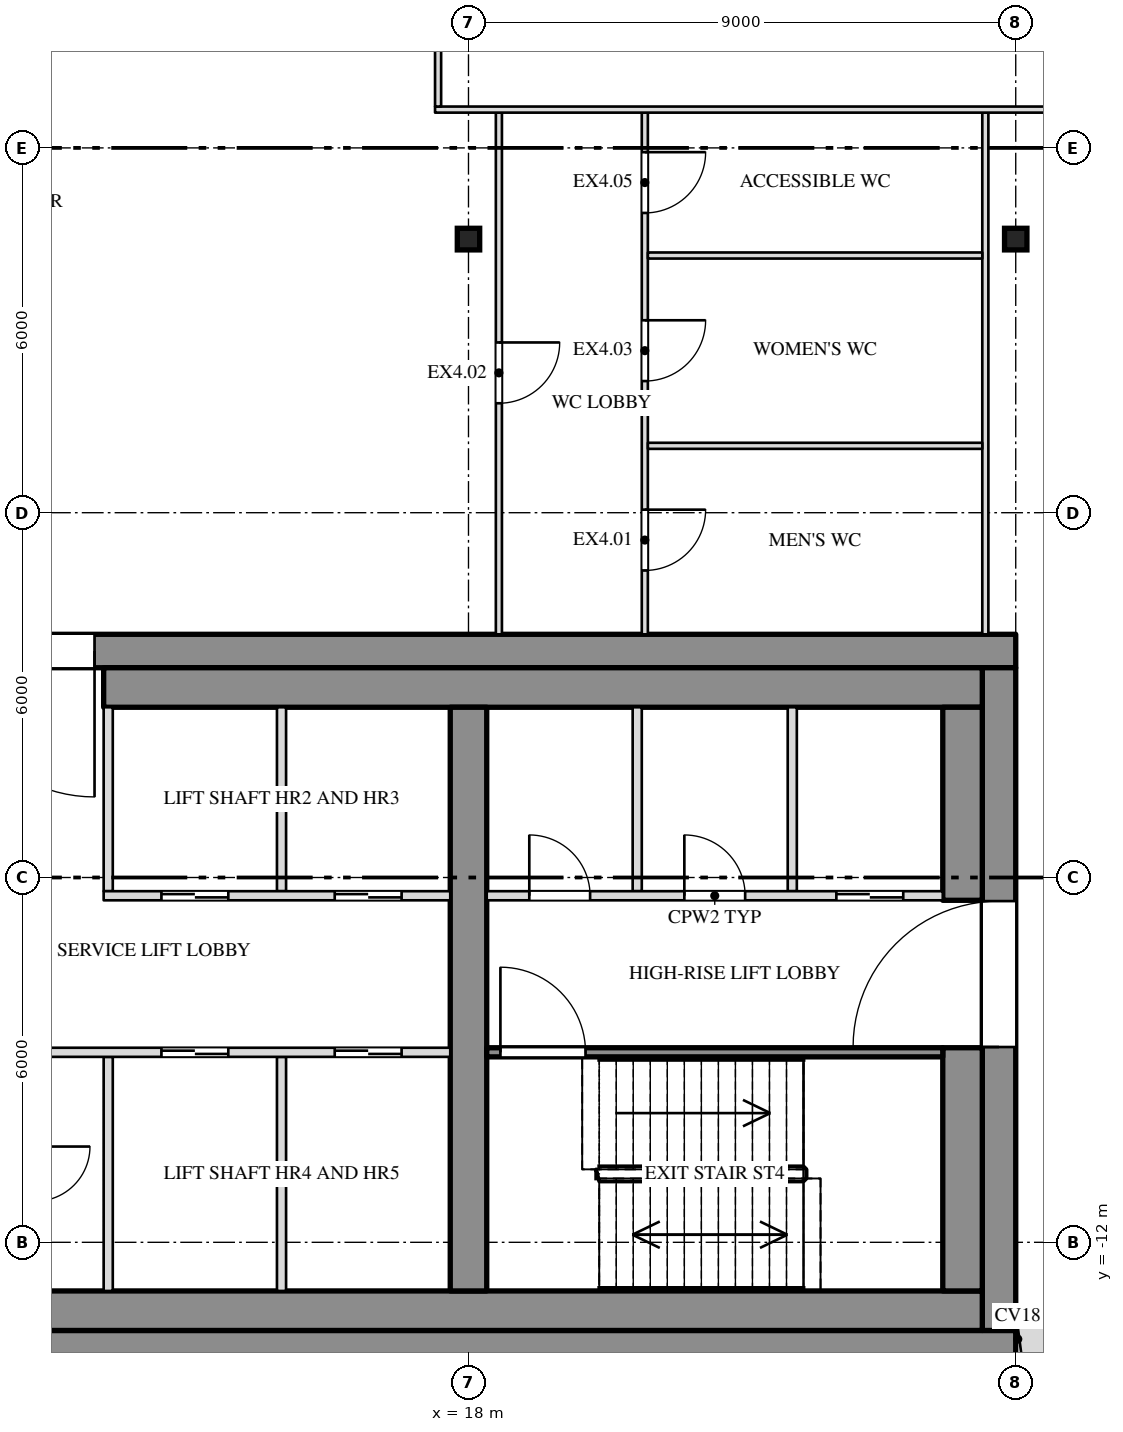
"""IFC4 building model, lengths in metres.
Left out: names, types, materials, properties, quantities, classifications, styles, units other than length and angle.
Written with IfcOpenShell. Run it as: python <this file> out.ifc"""

import sys

from ifc_helpers import new_model, si_unit, direction, frame, frame_2d, origin, origin_2d, place, context, subcontext, project, spatial, rectangle, i_section, extrude, element, fill, save


model = new_model("IFC4")
c1 = context("Model", 3, precision=1e-05, world=origin(), true_north=direction((0.0, 1.0)))
c2 = subcontext(c1, "Body", "Model", "MODEL_VIEW")
j1 = project(units=[si_unit("LENGTHUNIT", "METRE"), si_unit("PLANEANGLEUNIT", "RADIAN")], contexts=[c1])
p1 = place(None, origin())
s1 = spatial("IfcSite", under=j1, at=p1, CompositionType="ELEMENT")
p2 = place(p1, origin())
s2 = spatial("IfcBuilding", under=s1, at=p2, CompositionType="ELEMENT")
p3 = place(p2, frame((0.0, 0.0, 284.5)))
s3 = spatial("IfcBuildingStorey", under=s2, at=p3, CompositionType="ELEMENT", Elevation=284.5)
for number, where, z_axis, x_axis in (
    (1, (18.0, 4.5, 0.0), (0.0, 0.0, 1.0), (1.0, 0.0, 0.0)),
    (2, (27.0, 4.5, 0.0), (0.0, 0.0, 1.0), (1.0, 0.0, 0.0)),
):
    element("IfcColumn", number, at=place(p3, frame(where, z_axis=z_axis, x_axis=x_axis)), inside=s3, PredefinedType="COLUMN", context=c2, shape_type="SweptSolid", body=[
        extrude(i_section(OverallWidth=0.368, OverallDepth=0.356, WebThickness=0.011, FlangeThickness=0.018, at=origin_2d()), origin(), (0.0, 0.0, 1.0), 4.0),
    ])
p4 = place(p3, frame((-27.0, -2.275, 0.0), z_axis=(0.0, 0.0, 1.0), x_axis=(1.0, 0.0, 0.0)))
e3 = element("IfcWall", 3, at=p4, inside=s3, PredefinedType="SHEAR", context=c2, shape_type="SweptSolid", body=[
    extrude(rectangle(XDim=54.0, YDim=0.55, at=frame_2d((27.0, 0.0))), origin(), (0.0, 0.0, 1.0), 3.78),
])
p5 = place(p4, frame((15.15, 0.0, 0.0)))
e4 = element("IfcOpeningElement", 4, at=p5, cuts=e3, PredefinedType="OPENING", context=c2, shape_type="SweptSolid", body=[
    extrude(rectangle(XDim=2.4, YDim=2.1, at=frame_2d((1.2, 1.05))), frame((0.0, 0.287, 0.0), z_axis=(0.0, -1.0, 0.0), x_axis=(1.0, 0.0, 0.0)), (0.0, 0.0, 1.0), 0.574),
])
p6 = place(p4, frame((36.45, 0.0, 0.0)))
e5 = element("IfcOpeningElement", 5, at=p6, cuts=e3, PredefinedType="OPENING", context=c2, shape_type="SweptSolid", body=[
    extrude(rectangle(XDim=2.4, YDim=2.1, at=frame_2d((1.2, 1.05))), frame((0.0, 0.287, 0.0), z_axis=(0.0, -1.0, 0.0), x_axis=(1.0, 0.0, 0.0)), (0.0, 0.0, 1.0), 0.574),
])
p7 = place(p3, frame((-27.0, -13.725, 0.0), z_axis=(0.0, 0.0, 1.0), x_axis=(1.0, 0.0, 0.0)))
e6 = element("IfcWall", 6, at=p7, inside=s3, PredefinedType="SHEAR", context=c2, shape_type="SweptSolid", body=[
    extrude(rectangle(XDim=54.0, YDim=0.55, at=frame_2d((27.0, 0.0))), origin(), (0.0, 0.0, 1.0), 3.78),
])
p8 = place(p3, frame((26.725, -13.45, 0.0), z_axis=(0.0, 0.0, 1.0), x_axis=(0.0, 1.0, 0.0)))
e7 = element("IfcWall", 7, at=p8, inside=s3, PredefinedType="SHEAR", context=c2, shape_type="SweptSolid", body=[
    extrude(rectangle(XDim=10.9, YDim=0.55, at=frame_2d((5.45, 0.0))), origin(), (0.0, 0.0, 1.0), 3.78),
])
p9 = place(p8, frame((4.662, 0.0, 0.0)))
e8 = element("IfcOpeningElement", 8, at=p9, cuts=e7, PredefinedType="OPENING", context=c2, shape_type="SweptSolid", body=[
    extrude(rectangle(XDim=2.4, YDim=2.1, at=frame_2d((1.2, 1.05))), frame((0.0, 0.287, 0.0), z_axis=(0.0, -1.0, 0.0), x_axis=(1.0, 0.0, 0.0)), (0.0, 0.0, 1.0), 0.574),
])
p10 = place(p3, frame((12.0, -2.875, 0.0), z_axis=(0.0, 0.0, 1.0), x_axis=(1.0, 0.0, 0.0)))
e9 = element("IfcWall", 9, at=p10, inside=s3, PredefinedType="SHEAR", context=c2, shape_type="SweptSolid", body=[
    extrude(rectangle(XDim=14.45, YDim=0.65, at=frame_2d((7.225, 0.0))), origin(), (0.0, 0.0, 1.0), 3.78),
])
p11 = place(p3, frame((-26.45, -13.125, 0.0), z_axis=(0.0, 0.0, 1.0), x_axis=(1.0, 0.0, 0.0)))
e10 = element("IfcWall", 10, at=p11, inside=s3, PredefinedType="SHEAR", context=c2, shape_type="SweptSolid", body=[
    extrude(rectangle(XDim=52.9, YDim=0.65, at=frame_2d((26.45, 0.0))), origin(), (0.0, 0.0, 1.0), 3.78),
])
p12 = place(p3, frame((26.125, -12.8, 0.0), z_axis=(0.0, 0.0, 1.0), x_axis=(0.0, 1.0, 0.0)))
e11 = element("IfcWall", 11, at=p12, inside=s3, PredefinedType="SHEAR", context=c2, shape_type="SweptSolid", body=[
    extrude(rectangle(XDim=4.0, YDim=0.65, at=frame_2d((2.0, 0.0))), origin(), (0.0, 0.0, 1.0), 3.78),
])
p13 = place(p3, frame((26.125, -6.375, 0.0), z_axis=(0.0, 0.0, 1.0), x_axis=(0.0, 1.0, 0.0)))
e12 = element("IfcWall", 12, at=p13, inside=s3, PredefinedType="SHEAR", context=c2, shape_type="SweptSolid", body=[
    extrude(rectangle(XDim=3.175, YDim=0.65, at=frame_2d((1.587, 0.0))), origin(), (0.0, 0.0, 1.0), 3.78),
])
p14 = place(p3, frame((18.0, -12.8, 0.0), z_axis=(0.0, 0.0, 1.0), x_axis=(0.0, 1.0, 0.0)))
e13 = element("IfcWall", 13, at=p14, inside=s3, PredefinedType="SHEAR", context=c2, shape_type="SweptSolid", body=[
    extrude(rectangle(XDim=9.6, YDim=0.6, at=frame_2d((4.8, 0.0))), origin(), (0.0, 0.0, 1.0), 3.78),
])
p15 = place(p3, frame((18.5, -2.0, 0.0), z_axis=(0.0, 0.0, 1.0), x_axis=(0.0, 1.0, 0.0)))
e14 = element("IfcWall", 14, at=p15, inside=s3, PredefinedType="PARTITIONING", context=c2, shape_type="SweptSolid", body=[
    extrude(rectangle(XDim=8.58, YDim=0.1, at=frame_2d((4.29, 0.0))), origin(), (0.0, 0.0, 1.0), 3.78),
])
p16 = place(p15, frame((3.8, 0.0, 0.0)))
e15 = element("IfcOpeningElement", 15, at=p16, cuts=e14, PredefinedType="OPENING", context=c2, shape_type="SweptSolid", body=[
    extrude(rectangle(XDim=1.0, YDim=2.1, at=frame_2d((0.5, 1.05))), frame((0.0, 0.062, 0.0), z_axis=(0.0, -1.0, 0.0), x_axis=(1.0, 0.0, 0.0)), (0.0, 0.0, 1.0), 0.124),
])
p17 = place(p3, frame((20.9, -2.0, 0.0), z_axis=(0.0, 0.0, 1.0), x_axis=(0.0, 1.0, 0.0)))
e16 = element("IfcWall", 16, at=p17, inside=s3, PredefinedType="PARTITIONING", context=c2, shape_type="SweptSolid", body=[
    extrude(rectangle(XDim=8.58, YDim=0.1, at=frame_2d((4.29, 0.0))), origin(), (0.0, 0.0, 1.0), 3.78),
])
p18 = place(p17, frame((1.05, 0.0, 0.0)))
e17 = element("IfcOpeningElement", 17, at=p18, cuts=e16, PredefinedType="OPENING", context=c2, shape_type="SweptSolid", body=[
    extrude(rectangle(XDim=1.0, YDim=2.1, at=frame_2d((0.5, 1.05))), frame((0.0, 0.062, 0.0), z_axis=(0.0, -1.0, 0.0), x_axis=(1.0, 0.0, 0.0)), (0.0, 0.0, 1.0), 0.124),
])
p19 = place(p17, frame((4.165, 0.0, 0.0)))
e18 = element("IfcOpeningElement", 18, at=p19, cuts=e16, PredefinedType="OPENING", context=c2, shape_type="SweptSolid", body=[
    extrude(rectangle(XDim=1.0, YDim=2.1, at=frame_2d((0.5, 1.05))), frame((0.0, 0.062, 0.0), z_axis=(0.0, -1.0, 0.0), x_axis=(1.0, 0.0, 0.0)), (0.0, 0.0, 1.0), 0.124),
])
p20 = place(p17, frame((6.93, 0.0, 0.0)))
e19 = element("IfcOpeningElement", 19, at=p20, cuts=e16, PredefinedType="OPENING", context=c2, shape_type="SweptSolid", body=[
    extrude(rectangle(XDim=1.0, YDim=2.1, at=frame_2d((0.5, 1.05))), frame((0.0, 0.062, 0.0), z_axis=(0.0, -1.0, 0.0), x_axis=(1.0, 0.0, 0.0)), (0.0, 0.0, 1.0), 0.124),
])
p21 = place(p3, frame((26.5, -2.0, 0.0), z_axis=(0.0, 0.0, 1.0), x_axis=(0.0, 1.0, 0.0)))
e20 = element("IfcWall", 20, at=p21, inside=s3, PredefinedType="PARTITIONING", context=c2, shape_type="SweptSolid", body=[
    extrude(rectangle(XDim=8.58, YDim=0.1, at=frame_2d((4.29, 0.0))), origin(), (0.0, 0.0, 1.0), 3.78),
])
for number, where, z_axis, x_axis in (
    (21, (20.95, 1.1, 0.0), (0.0, 0.0, 1.0), (1.0, 0.0, 0.0)),
    (22, (20.95, 4.23, 0.0), (0.0, 0.0, 1.0), (1.0, 0.0, 0.0)),
):
    element("IfcWall", number, at=place(p3, frame(where, z_axis=z_axis, x_axis=x_axis)), inside=s3, PredefinedType="PARTITIONING", context=c2, shape_type="SweptSolid", body=[
        extrude(rectangle(XDim=5.5, YDim=0.1, at=frame_2d((2.75, 0.0))), origin(), (0.0, 0.0, 1.0), 3.78),
    ])
p22 = place(p3, frame((17.45, 6.63, 0.0), z_axis=(0.0, 0.0, 1.0), x_axis=(1.0, 0.0, 0.0)))
e23 = element("IfcWall", 23, at=p22, inside=s3, PredefinedType="PARTITIONING", context=c2, shape_type="SweptSolid", body=[
    extrude(rectangle(XDim=14.75, YDim=0.1, at=frame_2d((7.375, 0.0))), origin(), (0.0, 0.0, 1.0), 3.78),
])
p23 = place(p3, frame((17.5, 6.68, 0.0), z_axis=(0.0, 0.0, 1.0), x_axis=(0.0, 1.0, 0.0)))
e24 = element("IfcWall", 24, at=p23, inside=s3, PredefinedType="PARTITIONING", context=c2, shape_type="SweptSolid", body=[
    extrude(rectangle(XDim=29.52, YDim=0.1, at=frame_2d((14.76, 0.0))), origin(), (0.0, 0.0, 1.0), 3.78),
])
p24 = place(p23, frame((9.22, 0.0, 0.0)))
e25 = element("IfcOpeningElement", 25, at=p24, cuts=e24, PredefinedType="OPENING", context=c2, shape_type="SweptSolid", body=[
    extrude(rectangle(XDim=0.9, YDim=2.1, at=frame_2d((0.45, 1.05))), frame((0.0, 0.062, 0.0), z_axis=(0.0, -1.0, 0.0), x_axis=(1.0, 0.0, 0.0)), (0.0, 0.0, 1.0), 0.124),
])
p25 = place(p23, frame((16.56, 0.0, 0.0)))
e26 = element("IfcOpeningElement", 26, at=p25, cuts=e24, PredefinedType="OPENING", context=c2, shape_type="SweptSolid", body=[
    extrude(rectangle(XDim=0.9, YDim=2.1, at=frame_2d((0.45, 1.05))), frame((0.0, 0.062, 0.0), z_axis=(0.0, -1.0, 0.0), x_axis=(1.0, 0.0, 0.0)), (0.0, 0.0, 1.0), 0.124),
])
p26 = place(p3, frame((27.059, -13.589, 0.0), z_axis=(0.0, 0.0, 1.0), x_axis=(0.991443199569, 0.13053881426, 0.0)))
e27 = element("IfcWall", 27, at=p26, inside=s3, PredefinedType="SOLIDWALL", context=c2, shape_type="SweptSolid", body=[
    extrude(rectangle(XDim=1.348, YDim=0.8, at=frame_2d((0.674, 0.0))), origin(), (0.0, 0.0, 1.0), 3.78),
])
for number, where, z_axis, x_axis in (
    (28, (12.075, -6.225, 0.0), (0.0, 0.0, 1.0), (0.0, 1.0, 0.0)),
    (29, (14.925, -6.225, 0.0), (0.0, 0.0, 1.0), (0.0, 1.0, 0.0)),
    (30, (20.775, -6.225, 0.0), (0.0, 0.0, 1.0), (0.0, 1.0, 0.0)),
    (31, (23.325, -6.225, 0.0), (0.0, 0.0, 1.0), (0.0, 1.0, 0.0)),
):
    element("IfcWall", number, at=place(p3, frame(where, z_axis=z_axis, x_axis=x_axis)), inside=s3, PredefinedType="PARTITIONING", context=c2, shape_type="SweptSolid", body=[
        extrude(rectangle(XDim=3.025, YDim=0.15, at=frame_2d((1.513, 0.0))), origin(), (0.0, 0.0, 1.0), 3.78),
    ])
for number, where, z_axis, x_axis in (
    (32, (12.075, -12.8, 0.0), (0.0, 0.0, 1.0), (0.0, 1.0, 0.0)),
    (33, (14.925, -12.8, 0.0), (0.0, 0.0, 1.0), (0.0, 1.0, 0.0)),
):
    element("IfcWall", number, at=place(p3, frame(where, z_axis=z_axis, x_axis=x_axis)), inside=s3, PredefinedType="PARTITIONING", context=c2, shape_type="SweptSolid", body=[
        extrude(rectangle(XDim=3.85, YDim=0.15, at=frame_2d((1.925, 0.0))), origin(), (0.0, 0.0, 1.0), 3.78),
    ])
p27 = place(p3, frame((12.0, -6.3, 0.0), z_axis=(0.0, 0.0, 1.0), x_axis=(1.0, 0.0, 0.0)))
e34 = element("IfcWall", 34, at=p27, inside=s3, PredefinedType="PARTITIONING", context=c2, shape_type="SweptSolid", body=[
    extrude(rectangle(XDim=5.7, YDim=0.15, at=frame_2d((2.85, 0.0))), origin(), (0.0, 0.0, 1.0), 3.78),
])
p28 = place(p27, frame((0.95, 0.0, 0.0)))
e35 = element("IfcOpeningElement", 35, at=p28, cuts=e34, PredefinedType="OPENING", context=c2, shape_type="SweptSolid", body=[
    extrude(rectangle(XDim=1.1, YDim=2.1, at=frame_2d((0.55, 1.05))), frame((0.0, 0.087, 0.0), z_axis=(0.0, -1.0, 0.0), x_axis=(1.0, 0.0, 0.0)), (0.0, 0.0, 1.0), 0.174),
])
p29 = place(p27, frame((3.8, 0.0, 0.0)))
e36 = element("IfcOpeningElement", 36, at=p29, cuts=e34, PredefinedType="OPENING", context=c2, shape_type="SweptSolid", body=[
    extrude(rectangle(XDim=1.1, YDim=2.1, at=frame_2d((0.55, 1.05))), frame((0.0, 0.087, 0.0), z_axis=(0.0, -1.0, 0.0), x_axis=(1.0, 0.0, 0.0)), (0.0, 0.0, 1.0), 0.174),
])
p30 = place(p3, frame((18.3, -6.3, 0.0), z_axis=(0.0, 0.0, 1.0), x_axis=(1.0, 0.0, 0.0)))
e37 = element("IfcWall", 37, at=p30, inside=s3, PredefinedType="PARTITIONING", context=c2, shape_type="SweptSolid", body=[
    extrude(rectangle(XDim=7.5, YDim=0.15, at=frame_2d((3.75, 0.0))), origin(), (0.0, 0.0, 1.0), 3.78),
])
p31 = place(p30, frame((0.7, 0.0, 0.0)))
e38 = element("IfcOpeningElement", 38, at=p31, cuts=e37, PredefinedType="OPENING", context=c2, shape_type="SweptSolid", body=[
    extrude(rectangle(XDim=1.0, YDim=2.1, at=frame_2d((0.5, 1.05))), frame((0.0, 0.087, 0.0), z_axis=(0.0, -1.0, 0.0), x_axis=(1.0, 0.0, 0.0)), (0.0, 0.0, 1.0), 0.174),
])
p32 = place(p30, frame((3.25, 0.0, 0.0)))
e39 = element("IfcOpeningElement", 39, at=p32, cuts=e37, PredefinedType="OPENING", context=c2, shape_type="SweptSolid", body=[
    extrude(rectangle(XDim=1.0, YDim=2.1, at=frame_2d((0.5, 1.05))), frame((0.0, 0.087, 0.0), z_axis=(0.0, -1.0, 0.0), x_axis=(1.0, 0.0, 0.0)), (0.0, 0.0, 1.0), 0.174),
])
p33 = place(p30, frame((5.75, 0.0, 0.0)))
e40 = element("IfcOpeningElement", 40, at=p33, cuts=e37, PredefinedType="OPENING", context=c2, shape_type="SweptSolid", body=[
    extrude(rectangle(XDim=1.1, YDim=2.1, at=frame_2d((0.55, 1.05))), frame((0.0, 0.087, 0.0), z_axis=(0.0, -1.0, 0.0), x_axis=(1.0, 0.0, 0.0)), (0.0, 0.0, 1.0), 0.174),
])
p34 = place(p3, frame((10.8, -8.875, 0.0), z_axis=(0.0, 0.0, 1.0), x_axis=(1.0, 0.0, 0.0)))
e41 = element("IfcWall", 41, at=p34, inside=s3, PredefinedType="PARTITIONING", context=c2, shape_type="SweptSolid", body=[
    extrude(rectangle(XDim=6.9, YDim=0.15, at=frame_2d((3.45, 0.0))), origin(), (0.0, 0.0, 1.0), 3.78),
])
p35 = place(p34, frame((2.15, 0.0, 0.0)))
e42 = element("IfcOpeningElement", 42, at=p35, cuts=e41, PredefinedType="OPENING", context=c2, shape_type="SweptSolid", body=[
    extrude(rectangle(XDim=1.1, YDim=2.1, at=frame_2d((0.55, 1.05))), frame((0.0, 0.087, 0.0), z_axis=(0.0, -1.0, 0.0), x_axis=(1.0, 0.0, 0.0)), (0.0, 0.0, 1.0), 0.174),
])
p36 = place(p34, frame((5.0, 0.0, 0.0)))
e43 = element("IfcOpeningElement", 43, at=p36, cuts=e41, PredefinedType="OPENING", context=c2, shape_type="SweptSolid", body=[
    extrude(rectangle(XDim=1.1, YDim=2.1, at=frame_2d((0.55, 1.05))), frame((0.0, 0.087, 0.0), z_axis=(0.0, -1.0, 0.0), x_axis=(1.0, 0.0, 0.0)), (0.0, 0.0, 1.0), 0.174),
])
p37 = place(p3, frame((18.3, -8.875, 0.0), z_axis=(0.0, 0.0, 1.0), x_axis=(1.0, 0.0, 0.0)))
e44 = element("IfcWall", 44, at=p37, inside=s3, PredefinedType="SHEAR", context=c2, shape_type="SweptSolid", body=[
    extrude(rectangle(XDim=7.5, YDim=0.15, at=frame_2d((3.75, 0.0))), origin(), (0.0, 0.0, 1.0), 3.78),
])
p38 = place(p37, frame((0.225, 0.0, 0.0)))
e45 = element("IfcOpeningElement", 45, at=p38, cuts=e44, PredefinedType="OPENING", context=c2, shape_type="SweptSolid", body=[
    extrude(rectangle(XDim=1.4, YDim=2.1, at=frame_2d((0.7, 1.05))), frame((0.0, 0.087, 0.0), z_axis=(0.0, -1.0, 0.0), x_axis=(1.0, 0.0, 0.0)), (0.0, 0.0, 1.0), 0.174),
])
p39 = place(p18, origin())
e46 = element("IfcDoor", 46, at=p39, inside=s3, OperationType="SINGLE_SWING_LEFT", PredefinedType="DOOR", context=c2, shape_type="SweptSolid", body=[
    extrude(rectangle(XDim=1.0, YDim=2.1, at=frame_2d((0.5, 1.05))), frame((0.0, 0.025, 0.0), z_axis=(0.0, -1.0, 0.0), x_axis=(1.0, 0.0, 0.0)), (0.0, 0.0, 1.0), 0.05),
])
fill(e17, e46)
p40 = place(p16, origin())
e47 = element("IfcDoor", 47, at=p40, inside=s3, OperationType="SINGLE_SWING_LEFT", PredefinedType="DOOR", context=c2, shape_type="SweptSolid", body=[
    extrude(rectangle(XDim=1.0, YDim=2.1, at=frame_2d((0.5, 1.05))), frame((0.0, 0.025, 0.0), z_axis=(0.0, -1.0, 0.0), x_axis=(1.0, 0.0, 0.0)), (0.0, 0.0, 1.0), 0.05),
])
fill(e15, e47)
p41 = place(p19, origin())
e48 = element("IfcDoor", 48, at=p41, inside=s3, OperationType="SINGLE_SWING_LEFT", PredefinedType="DOOR", context=c2, shape_type="SweptSolid", body=[
    extrude(rectangle(XDim=1.0, YDim=2.1, at=frame_2d((0.5, 1.05))), frame((0.0, 0.025, 0.0), z_axis=(0.0, -1.0, 0.0), x_axis=(1.0, 0.0, 0.0)), (0.0, 0.0, 1.0), 0.05),
])
fill(e18, e48)
p42 = place(p20, origin())
e49 = element("IfcDoor", 49, at=p42, inside=s3, OperationType="SINGLE_SWING_LEFT", PredefinedType="DOOR", context=c2, shape_type="SweptSolid", body=[
    extrude(rectangle(XDim=1.0, YDim=2.1, at=frame_2d((0.5, 1.05))), frame((0.0, 0.025, 0.0), z_axis=(0.0, -1.0, 0.0), x_axis=(1.0, 0.0, 0.0)), (0.0, 0.0, 1.0), 0.05),
])
fill(e19, e49)
p43 = place(p6, origin())
e50 = element("IfcDoor", 50, at=p43, inside=s3, OperationType="DOUBLE_DOOR_SINGLE_SWING", PredefinedType="DOOR", context=c2, shape_type="SweptSolid", body=[
    extrude(rectangle(XDim=2.4, YDim=2.1, at=frame_2d((1.2, 1.05))), frame((0.0, 0.025, 0.0), z_axis=(0.0, -1.0, 0.0), x_axis=(1.0, 0.0, 0.0)), (0.0, 0.0, 1.0), 0.05),
])
fill(e5, e50)
p44 = place(p35, origin())
e51 = element("IfcDoor", 51, at=p44, inside=s3, OperationType="SLIDING_TO_RIGHT", PredefinedType="DOOR", context=c2, shape_type="SweptSolid", body=[
    extrude(rectangle(XDim=1.1, YDim=2.1, at=frame_2d((0.55, 1.05))), frame((0.0, 0.025, 0.0), z_axis=(0.0, -1.0, 0.0), x_axis=(1.0, 0.0, 0.0)), (0.0, 0.0, 1.0), 0.05),
])
fill(e42, e51)
p45 = place(p28, origin())
e52 = element("IfcDoor", 52, at=p45, inside=s3, OperationType="SLIDING_TO_LEFT", PredefinedType="DOOR", context=c2, shape_type="SweptSolid", body=[
    extrude(rectangle(XDim=1.1, YDim=2.1, at=frame_2d((0.55, 1.05))), frame((0.0, 0.025, 0.0), z_axis=(0.0, -1.0, 0.0), x_axis=(1.0, 0.0, 0.0)), (0.0, 0.0, 1.0), 0.05),
])
fill(e35, e52)
p46 = place(p36, origin())
e53 = element("IfcDoor", 53, at=p46, inside=s3, OperationType="SLIDING_TO_RIGHT", PredefinedType="DOOR", context=c2, shape_type="SweptSolid", body=[
    extrude(rectangle(XDim=1.1, YDim=2.1, at=frame_2d((0.55, 1.05))), frame((0.0, 0.025, 0.0), z_axis=(0.0, -1.0, 0.0), x_axis=(1.0, 0.0, 0.0)), (0.0, 0.0, 1.0), 0.05),
])
fill(e43, e53)
p47 = place(p29, origin())
e54 = element("IfcDoor", 54, at=p47, inside=s3, OperationType="SLIDING_TO_LEFT", PredefinedType="DOOR", context=c2, shape_type="SweptSolid", body=[
    extrude(rectangle(XDim=1.1, YDim=2.1, at=frame_2d((0.55, 1.05))), frame((0.0, 0.025, 0.0), z_axis=(0.0, -1.0, 0.0), x_axis=(1.0, 0.0, 0.0)), (0.0, 0.0, 1.0), 0.05),
])
fill(e36, e54)
p48 = place(p38, origin())
e55 = element("IfcDoor", 55, at=p48, inside=s3, OperationType="DOUBLE_DOOR_SINGLE_SWING", PredefinedType="DOOR", context=c2, shape_type="SweptSolid", body=[
    extrude(rectangle(XDim=1.4, YDim=2.1, at=frame_2d((0.7, 1.05))), frame((0.0, 0.025, 0.0), z_axis=(0.0, -1.0, 0.0), x_axis=(1.0, 0.0, 0.0)), (0.0, 0.0, 1.0), 0.05),
])
fill(e45, e55)
p49 = place(p31, origin())
e56 = element("IfcDoor", 56, at=p49, inside=s3, OperationType="SINGLE_SWING_LEFT", PredefinedType="DOOR", context=c2, shape_type="SweptSolid", body=[
    extrude(rectangle(XDim=1.0, YDim=2.1, at=frame_2d((0.5, 1.05))), frame((0.0, 0.025, 0.0), z_axis=(0.0, -1.0, 0.0), x_axis=(1.0, 0.0, 0.0)), (0.0, 0.0, 1.0), 0.05),
])
fill(e38, e56)
p50 = place(p32, origin())
e57 = element("IfcDoor", 57, at=p50, inside=s3, OperationType="SINGLE_SWING_LEFT", PredefinedType="DOOR", context=c2, shape_type="SweptSolid", body=[
    extrude(rectangle(XDim=1.0, YDim=2.1, at=frame_2d((0.5, 1.05))), frame((0.0, 0.025, 0.0), z_axis=(0.0, -1.0, 0.0), x_axis=(1.0, 0.0, 0.0)), (0.0, 0.0, 1.0), 0.05),
])
fill(e39, e57)
p51 = place(p33, origin())
e58 = element("IfcDoor", 58, at=p51, inside=s3, OperationType="SLIDING_TO_LEFT", PredefinedType="DOOR", context=c2, shape_type="SweptSolid", body=[
    extrude(rectangle(XDim=1.1, YDim=2.1, at=frame_2d((0.55, 1.05))), frame((0.0, 0.025, 0.0), z_axis=(0.0, -1.0, 0.0), x_axis=(1.0, 0.0, 0.0)), (0.0, 0.0, 1.0), 0.05),
])
fill(e40, e58)
p52 = place(p9, origin())
e59 = element("IfcDoor", 59, at=p52, inside=s3, OperationType="DOUBLE_DOOR_SINGLE_SWING", PredefinedType="DOOR", context=c2, shape_type="SweptSolid", body=[
    extrude(rectangle(XDim=2.4, YDim=2.1, at=frame_2d((1.2, 1.05))), frame((0.0, 0.025, 0.0), z_axis=(0.0, -1.0, 0.0), x_axis=(1.0, 0.0, 0.0)), (0.0, 0.0, 1.0), 0.05),
])
fill(e8, e59)
save(model, sys.argv[1])
